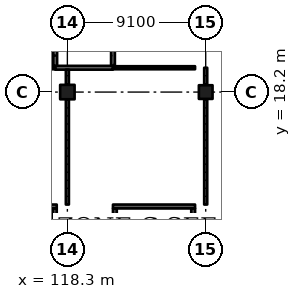
"""IFC4 building model, lengths in metres.
Left out: names, types, materials, properties, quantities, classifications, styles, units other than length and angle.
Written with IfcOpenShell. Run it as: python <this file> out.ifc"""

import sys

from ifc_helpers import new_model, si_unit, direction, frame, frame_2d, origin, origin_2d, place, context, subcontext, project, spatial, rectangle, extrude, element, fill, save


model = new_model("IFC4")
c1 = context("Model", 3, precision=1e-05, world=origin(), true_north=direction((0.0, 1.0)))
c2 = subcontext(c1, "Body", "Model", "MODEL_VIEW")
j1 = project(units=[si_unit("LENGTHUNIT", "METRE"), si_unit("PLANEANGLEUNIT", "RADIAN")], contexts=[c1])
p1 = place(None, origin())
s1 = spatial("IfcSite", under=j1, at=p1, CompositionType="ELEMENT")
p2 = place(p1, origin())
s2 = spatial("IfcBuilding", under=s1, at=p2, CompositionType="ELEMENT")
p3 = place(p2, origin())
s3 = spatial("IfcBuildingStorey", under=s2, at=p3, CompositionType="ELEMENT", Elevation=0.0)
p4 = place(p3, frame((118.3, 18.2, -0.4), z_axis=(0.0, 0.0, 1.0), x_axis=(1.0, 0.0, 0.0)))
e1 = element("IfcColumn", 1, at=p4, inside=s3, PredefinedType="COLUMN", context=c2, shape_type="SweptSolid", body=[
    extrude(rectangle(XDim=0.95, YDim=0.95, at=origin_2d()), origin(), (0.0, 0.0, 1.0), 6.77),
])
p5 = place(p3, frame((127.4, 18.2, -0.4), z_axis=(0.0, 0.0, 1.0), x_axis=(1.0, 0.0, 0.0)))
e2 = element("IfcColumn", 2, at=p5, inside=s3, PredefinedType="COLUMN", context=c2, shape_type="SweptSolid", body=[
    extrude(rectangle(XDim=0.9, YDim=0.9, at=origin_2d()), origin(), (0.0, 0.0, 1.0), 6.77),
])
p6 = place(p3, frame((126.7, 10.675, -0.4), z_axis=(0.0, 0.0, 1.0), x_axis=(-1.0, 0.0, 0.0)))
e3 = element("IfcWall", 3, at=p6, inside=s3, PredefinedType="SHEAR", context=c2, shape_type="SweptSolid", body=[
    extrude(rectangle(XDim=5.4, YDim=0.25, at=frame_2d((2.7, 0.0))), origin(), (0.0, 0.0, 1.0), 6.77),
])
p7 = place(p6, frame((1.5, 0.0, 0.4)))
e4 = element("IfcOpeningElement", 4, at=p7, cuts=e3, PredefinedType="OPENING", context=c2, shape_type="SweptSolid", body=[
    extrude(rectangle(XDim=2.4, YDim=2.1, at=frame_2d((1.2, 1.05))), frame((0.0, 0.135, 0.0), z_axis=(0.0, -1.0, 0.0), x_axis=(1.0, 0.0, 0.0)), (0.0, 0.0, 1.0), 0.27),
])
p8 = place(p3, frame((121.425, 10.55, -0.4), z_axis=(0.0, 0.0, 1.0), x_axis=(0.0, -1.0, 0.0)))
e5 = element("IfcWall", 5, at=p8, inside=s3, PredefinedType="SHEAR", context=c2, shape_type="SweptSolid", body=[
    extrude(rectangle(XDim=9.6, YDim=0.25, at=frame_2d((4.8, 0.0))), origin(), (0.0, 0.0, 1.0), 6.77),
])
p9 = place(p8, frame((0.45, 0.0, 0.4)))
e6 = element("IfcOpeningElement", 6, at=p9, cuts=e5, PredefinedType="OPENING", context=c2, shape_type="SweptSolid", body=[
    extrude(rectangle(XDim=1.2, YDim=2.1, at=frame_2d((0.6, 1.05))), frame((0.0, 0.135, 0.0), z_axis=(0.0, -1.0, 0.0), x_axis=(1.0, 0.0, 0.0)), (0.0, 0.0, 1.0), 0.27),
])
p10 = place(p3, frame((126.575, 10.55, -0.4), z_axis=(0.0, 0.0, 1.0), x_axis=(0.0, -1.0, 0.0)))
e7 = element("IfcWall", 7, at=p10, inside=s3, PredefinedType="SHEAR", context=c2, shape_type="SweptSolid", body=[
    extrude(rectangle(XDim=9.6, YDim=0.25, at=frame_2d((4.8, 0.0))), origin(), (0.0, 0.0, 1.0), 6.77),
])
p11 = place(p3, frame((117.6, 10.675, -0.4), z_axis=(0.0, 0.0, 1.0), x_axis=(-1.0, 0.0, 0.0)))
e8 = element("IfcWall", 8, at=p11, inside=s3, PredefinedType="SHEAR", context=c2, shape_type="SweptSolid", body=[
    extrude(rectangle(XDim=5.4, YDim=0.25, at=frame_2d((2.7, 0.0))), origin(), (0.0, 0.0, 1.0), 6.77),
])
p12 = place(p11, frame((1.5, 0.0, 0.4)))
e9 = element("IfcOpeningElement", 9, at=p12, cuts=e8, PredefinedType="OPENING", context=c2, shape_type="SweptSolid", body=[
    extrude(rectangle(XDim=2.4, YDim=2.1, at=frame_2d((1.2, 1.05))), frame((0.0, 0.135, 0.0), z_axis=(0.0, -1.0, 0.0), x_axis=(1.0, 0.0, 0.0)), (0.0, 0.0, 1.0), 0.27),
])
p13 = place(p3, frame((117.475, 10.55, -0.4), z_axis=(0.0, 0.0, 1.0), x_axis=(0.0, -1.0, 0.0)))
e10 = element("IfcWall", 10, at=p13, inside=s3, PredefinedType="SHEAR", context=c2, shape_type="SweptSolid", body=[
    extrude(rectangle(XDim=9.6, YDim=0.25, at=frame_2d((4.8, 0.0))), origin(), (0.0, 0.0, 1.0), 6.77),
])
p14 = place(p3, frame((112.2, 19.8, 0.0), z_axis=(0.0, 0.0, 1.0), x_axis=(1.0, 0.0, 0.0)))
e11 = element("IfcWall", 11, at=p14, inside=s3, PredefinedType="PARTITIONING", context=c2, shape_type="SweptSolid", body=[
    extrude(rectangle(XDim=5.3, YDim=0.2, at=frame_2d((2.65, 0.0))), origin(), (0.0, 0.0, 1.0), 6.02),
])
p15 = place(p14, frame((1.75, 0.0, 0.0)))
e12 = element("IfcOpeningElement", 12, at=p15, cuts=e11, PredefinedType="OPENING", context=c2, shape_type="SweptSolid", body=[
    extrude(rectangle(XDim=1.8, YDim=2.4, at=frame_2d((0.9, 1.2))), frame((0.0, 0.11, 0.0), z_axis=(0.0, -1.0, 0.0), x_axis=(1.0, 0.0, 0.0)), (0.0, 0.0, 1.0), 0.22),
])
p16 = place(p3, frame((117.5, 19.8, 0.0), z_axis=(0.0, 0.0, 1.0), x_axis=(1.0, 0.0, 0.0)))
e13 = element("IfcWall", 13, at=p16, inside=s3, PredefinedType="SOLIDWALL", context=c2, shape_type="SweptSolid", body=[
    extrude(rectangle(XDim=3.8, YDim=0.25, at=frame_2d((1.9, 0.0))), origin(), (0.0, 0.0, 1.0), 6.02),
])
p17 = place(p16, frame((1.85, 0.0, 0.0)))
e14 = element("IfcOpeningElement", 14, at=p17, cuts=e13, PredefinedType="OPENING", context=c2, shape_type="SweptSolid", body=[
    extrude(rectangle(XDim=1.0, YDim=2.1, at=frame_2d((0.5, 1.05))), frame((0.0, 0.135, 0.0), z_axis=(0.0, -1.0, 0.0), x_axis=(1.0, 0.0, 0.0)), (0.0, 0.0, 1.0), 0.27),
])
p18 = place(p3, frame((117.5, 19.925, 0.0), z_axis=(0.0, 0.0, 1.0), x_axis=(0.0, 1.0, 0.0)))
e15 = element("IfcWall", 15, at=p18, inside=s3, PredefinedType="SOLIDWALL", context=c2, shape_type="SweptSolid", body=[
    extrude(rectangle(XDim=2.845, YDim=0.25, at=frame_2d((1.422, 0.0))), origin(), (0.0, 0.0, 1.0), 6.02),
])
p19 = place(p3, frame((118.3, 10.8, 0.0), z_axis=(0.0, 0.0, 1.0), x_axis=(0.0, 1.0, 0.0)))
e16 = element("IfcWall", 16, at=p19, inside=s3, PredefinedType="PARTITIONING", context=c2, shape_type="SweptSolid", body=[
    extrude(rectangle(XDim=6.925, YDim=0.2, at=frame_2d((3.462, 0.0))), origin(), (0.0, 0.0, 1.0), 5.32),
])
p20 = place(p19, frame((0.85, 0.0, 0.0)))
e17 = element("IfcOpeningElement", 17, at=p20, cuts=e16, PredefinedType="OPENING", context=c2, shape_type="SweptSolid", body=[
    extrude(rectangle(XDim=1.8, YDim=2.4, at=frame_2d((0.9, 1.2))), frame((0.0, 0.11, 0.0), z_axis=(0.0, -1.0, 0.0), x_axis=(1.0, 0.0, 0.0)), (0.0, 0.0, 1.0), 0.22),
])
p21 = place(p19, frame((4.25, 0.0, 0.0)))
e18 = element("IfcOpeningElement", 18, at=p21, cuts=e16, PredefinedType="OPENING", context=c2, shape_type="SweptSolid", body=[
    extrude(rectangle(XDim=1.8, YDim=2.4, at=frame_2d((0.9, 1.2))), frame((0.0, 0.11, 0.0), z_axis=(0.0, -1.0, 0.0), x_axis=(1.0, 0.0, 0.0)), (0.0, 0.0, 1.0), 0.22),
])
p22 = place(p3, frame((118.3, 18.675, 0.0), z_axis=(0.0, 0.0, 1.0), x_axis=(0.0, 1.0, 0.0)))
e19 = element("IfcWall", 19, at=p22, inside=s3, PredefinedType="PARTITIONING", context=c2, shape_type="SweptSolid", body=[
    extrude(rectangle(XDim=1.0, YDim=0.2, at=frame_2d((0.5, 0.0))), origin(), (0.0, 0.0, 1.0), 5.32),
])
p23 = place(p3, frame((121.3, 19.8, 0.0), z_axis=(0.0, 0.0, 1.0), x_axis=(1.0, 0.0, 0.0)))
e20 = element("IfcWall", 20, at=p23, inside=s3, PredefinedType="PARTITIONING", context=c2, shape_type="SweptSolid", body=[
    extrude(rectangle(XDim=5.4, YDim=0.2, at=frame_2d((2.7, 0.0))), origin(), (0.0, 0.0, 1.0), 6.02),
])
p24 = place(p23, frame((1.85, 0.0, 0.0)))
e21 = element("IfcOpeningElement", 21, at=p24, cuts=e20, PredefinedType="OPENING", context=c2, shape_type="SweptSolid", body=[
    extrude(rectangle(XDim=1.8, YDim=2.4, at=frame_2d((0.9, 1.2))), frame((0.0, 0.11, 0.0), z_axis=(0.0, -1.0, 0.0), x_axis=(1.0, 0.0, 0.0)), (0.0, 0.0, 1.0), 0.22),
])
p25 = place(p3, frame((121.3, 19.925, 0.0), z_axis=(0.0, 0.0, 1.0), x_axis=(0.0, 1.0, 0.0)))
e22 = element("IfcWall", 22, at=p25, inside=s3, PredefinedType="SOLIDWALL", context=c2, shape_type="SweptSolid", body=[
    extrude(rectangle(XDim=6.945, YDim=0.25, at=frame_2d((3.473, 0.0))), origin(), (0.0, 0.0, 1.0), 6.02),
])
p26 = place(p3, frame((127.4, 10.8, 0.0), z_axis=(0.0, 0.0, 1.0), x_axis=(0.0, 1.0, 0.0)))
e23 = element("IfcWall", 23, at=p26, inside=s3, PredefinedType="PARTITIONING", context=c2, shape_type="SweptSolid", body=[
    extrude(rectangle(XDim=6.95, YDim=0.2, at=frame_2d((3.475, 0.0))), origin(), (0.0, 0.0, 1.0), 5.32),
])
p27 = place(p26, frame((0.85, 0.0, 0.0)))
e24 = element("IfcOpeningElement", 24, at=p27, cuts=e23, PredefinedType="OPENING", context=c2, shape_type="SweptSolid", body=[
    extrude(rectangle(XDim=1.8, YDim=2.4, at=frame_2d((0.9, 1.2))), frame((0.0, 0.11, 0.0), z_axis=(0.0, -1.0, 0.0), x_axis=(1.0, 0.0, 0.0)), (0.0, 0.0, 1.0), 0.22),
])
p28 = place(p26, frame((4.35, 0.0, 0.0)))
e25 = element("IfcOpeningElement", 25, at=p28, cuts=e23, PredefinedType="OPENING", context=c2, shape_type="SweptSolid", body=[
    extrude(rectangle(XDim=1.8, YDim=2.4, at=frame_2d((0.9, 1.2))), frame((0.0, 0.11, 0.0), z_axis=(0.0, -1.0, 0.0), x_axis=(1.0, 0.0, 0.0)), (0.0, 0.0, 1.0), 0.22),
])
p29 = place(p3, frame((127.4, 18.65, 0.0), z_axis=(0.0, 0.0, 1.0), x_axis=(0.0, 1.0, 0.0)))
e26 = element("IfcWall", 26, at=p29, inside=s3, PredefinedType="PARTITIONING", context=c2, shape_type="SweptSolid", body=[
    extrude(rectangle(XDim=1.15, YDim=0.2, at=frame_2d((0.575, 0.0))), origin(), (0.0, 0.0, 1.0), 5.32),
])
p30 = place(p17, origin())
e27 = element("IfcDoor", 27, at=p30, inside=s3, OperationType="SINGLE_SWING_LEFT", PredefinedType="DOOR", context=c2, shape_type="SweptSolid", body=[
    extrude(rectangle(XDim=1.0, YDim=2.1, at=frame_2d((0.5, 1.05))), frame((0.0, 0.025, 0.0), z_axis=(0.0, -1.0, 0.0), x_axis=(1.0, 0.0, 0.0)), (0.0, 0.0, 1.0), 0.05),
])
fill(e14, e27)
p31 = place(p27, origin())
e28 = element("IfcDoor", 28, at=p31, inside=s3, OperationType="DOUBLE_DOOR_SINGLE_SWING", PredefinedType="DOOR", context=c2, shape_type="SweptSolid", body=[
    extrude(rectangle(XDim=1.8, YDim=2.4, at=frame_2d((0.9, 1.2))), frame((0.0, 0.025, 0.0), z_axis=(0.0, -1.0, 0.0), x_axis=(1.0, 0.0, 0.0)), (0.0, 0.0, 1.0), 0.05),
])
fill(e24, e28)
p32 = place(p28, origin())
e29 = element("IfcDoor", 29, at=p32, inside=s3, OperationType="DOUBLE_DOOR_SINGLE_SWING", PredefinedType="DOOR", context=c2, shape_type="SweptSolid", body=[
    extrude(rectangle(XDim=1.8, YDim=2.4, at=frame_2d((0.9, 1.2))), frame((0.0, 0.025, 0.0), z_axis=(0.0, -1.0, 0.0), x_axis=(1.0, 0.0, 0.0)), (0.0, 0.0, 1.0), 0.05),
])
fill(e25, e29)
p33 = place(p20, origin())
e30 = element("IfcDoor", 30, at=p33, inside=s3, OperationType="DOUBLE_DOOR_SINGLE_SWING", PredefinedType="DOOR", context=c2, shape_type="SweptSolid", body=[
    extrude(rectangle(XDim=1.8, YDim=2.4, at=frame_2d((0.9, 1.2))), frame((0.0, 0.025, 0.0), z_axis=(0.0, -1.0, 0.0), x_axis=(1.0, 0.0, 0.0)), (0.0, 0.0, 1.0), 0.05),
])
fill(e17, e30)
p34 = place(p21, origin())
e31 = element("IfcDoor", 31, at=p34, inside=s3, OperationType="DOUBLE_DOOR_SINGLE_SWING", PredefinedType="DOOR", context=c2, shape_type="SweptSolid", body=[
    extrude(rectangle(XDim=1.8, YDim=2.4, at=frame_2d((0.9, 1.2))), frame((0.0, 0.025, 0.0), z_axis=(0.0, -1.0, 0.0), x_axis=(1.0, 0.0, 0.0)), (0.0, 0.0, 1.0), 0.05),
])
fill(e18, e31)
p35 = place(p24, origin())
e32 = element("IfcDoor", 32, at=p35, inside=s3, OperationType="DOUBLE_DOOR_SINGLE_SWING", PredefinedType="DOOR", context=c2, shape_type="SweptSolid", body=[
    extrude(rectangle(XDim=1.8, YDim=2.4, at=frame_2d((0.9, 1.2))), frame((0.0, 0.025, 0.0), z_axis=(0.0, -1.0, 0.0), x_axis=(1.0, 0.0, 0.0)), (0.0, 0.0, 1.0), 0.05),
])
fill(e21, e32)
p36 = place(p7, origin())
e33 = element("IfcDoor", 33, at=p36, inside=s3, OperationType="DOUBLE_DOOR_SINGLE_SWING", PredefinedType="DOOR", context=c2, shape_type="SweptSolid", body=[
    extrude(rectangle(XDim=2.4, YDim=2.1, at=frame_2d((1.2, 1.05))), frame((0.0, 0.025, 0.0), z_axis=(0.0, -1.0, 0.0), x_axis=(1.0, 0.0, 0.0)), (0.0, 0.0, 1.0), 0.05),
])
fill(e4, e33)
p37 = place(p9, origin())
e34 = element("IfcDoor", 34, at=p37, inside=s3, OperationType="SINGLE_SWING_LEFT", PredefinedType="DOOR", context=c2, shape_type="SweptSolid", body=[
    extrude(rectangle(XDim=1.2, YDim=2.1, at=frame_2d((0.6, 1.05))), frame((0.0, 0.025, 0.0), z_axis=(0.0, -1.0, 0.0), x_axis=(1.0, 0.0, 0.0)), (0.0, 0.0, 1.0), 0.05),
])
fill(e6, e34)
save(model, sys.argv[1])
